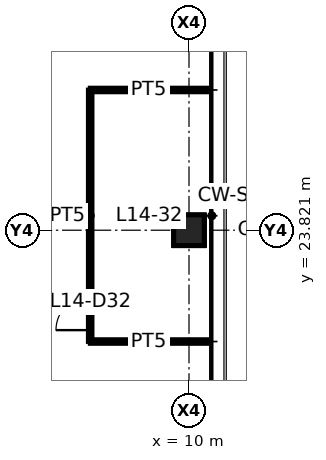
"""IFC4 building model, lengths in metres.
Left out: names, types, materials, properties, quantities, classifications, styles, units other than length and angle.
Written with IfcOpenShell. Run it as: python <this file> out.ifc"""

import sys

from ifc_helpers import new_model, si_unit, direction, frame, frame_2d, origin, origin_2d, place, context, subcontext, project, spatial, rectangle, hollow_rectangle, extrude, element, fill, save


model = new_model("IFC4")
c1 = context("Model", 3, precision=1e-05, world=origin(), true_north=direction((0.0, 1.0)))
c2 = subcontext(c1, "Body", "Model", "MODEL_VIEW")
j1 = project(units=[si_unit("LENGTHUNIT", "METRE"), si_unit("PLANEANGLEUNIT", "RADIAN")], contexts=[c1])
p1 = place(None, origin())
s1 = spatial("IfcSite", under=j1, at=p1, CompositionType="ELEMENT")
p2 = place(p1, origin())
s2 = spatial("IfcBuilding", under=s1, at=p2, CompositionType="ELEMENT")
p3 = place(p2, frame((0.0, 0.0, 57.0)))
s3 = spatial("IfcBuildingStorey", under=s2, at=p3, CompositionType="ELEMENT", Elevation=57.0)
p4 = place(p3, frame((10.0, 23.821, 0.0), z_axis=(0.0, 0.0, 1.0), x_axis=(1.0, 0.0, 0.0)))
e1 = element("IfcColumn", 1, at=p4, inside=s3, PredefinedType="COLUMN", context=c2, shape_type="SweptSolid", body=[
    extrude(hollow_rectangle(XDim=0.8, YDim=0.8, WallThickness=0.045, at=origin_2d()), origin(), (0.0, 0.0, 1.0), 4.2),
])
p5 = place(p3, frame((7.4, 20.891, 0.0), z_axis=(0.0, 0.0, 1.0), x_axis=(0.0, 1.0, 0.0)))
e2 = element("IfcWall", 2, at=p5, inside=s3, PredefinedType="PARTITIONING", context=c2, shape_type="SweptSolid", body=[
    extrude(rectangle(XDim=6.62, YDim=0.1, at=frame_2d((3.31, 0.0))), origin(), (0.0, 0.0, 1.0), 3.25),
])
p6 = place(p5, frame((0.3, 0.0, 0.0)))
e3 = element("IfcOpeningElement", 3, at=p6, cuts=e2, PredefinedType="OPENING", context=c2, shape_type="SweptSolid", body=[
    extrude(rectangle(XDim=0.9, YDim=2.1, at=frame_2d((0.45, 1.05))), frame((0.0, 0.06, 0.0), z_axis=(0.0, -1.0, 0.0), x_axis=(1.0, 0.0, 0.0)), (0.0, 0.0, 1.0), 0.12),
])
for number, where, z_axis, x_axis in (
    (4, (7.4, 27.511, 0.0), (0.0, 0.0, 1.0), (1.0, 0.0, 0.0)),
    (5, (10.47, 20.891, 0.0), (0.0, 0.0, 1.0), (-1.0, 0.0, 0.0)),
):
    element("IfcWall", number, at=place(p3, frame(where, z_axis=z_axis, x_axis=x_axis)), inside=s3, PredefinedType="PARTITIONING", context=c2, shape_type="SweptSolid", body=[
        extrude(rectangle(XDim=3.07, YDim=0.1, at=frame_2d((1.535, 0.0))), origin(), (0.0, 0.0, 1.0), 3.25),
    ])
p7 = place(p6, origin())
e6 = element("IfcDoor", 6, at=p7, inside=s3, OperationType="SINGLE_SWING_LEFT", PredefinedType="DOOR", context=c2, shape_type="SweptSolid", body=[
    extrude(rectangle(XDim=0.9, YDim=2.1, at=frame_2d((0.45, 1.05))), frame((0.0, 0.025, 0.0), z_axis=(0.0, -1.0, 0.0), x_axis=(1.0, 0.0, 0.0)), (0.0, 0.0, 1.0), 0.05),
])
fill(e3, e6)
save(model, sys.argv[1])
